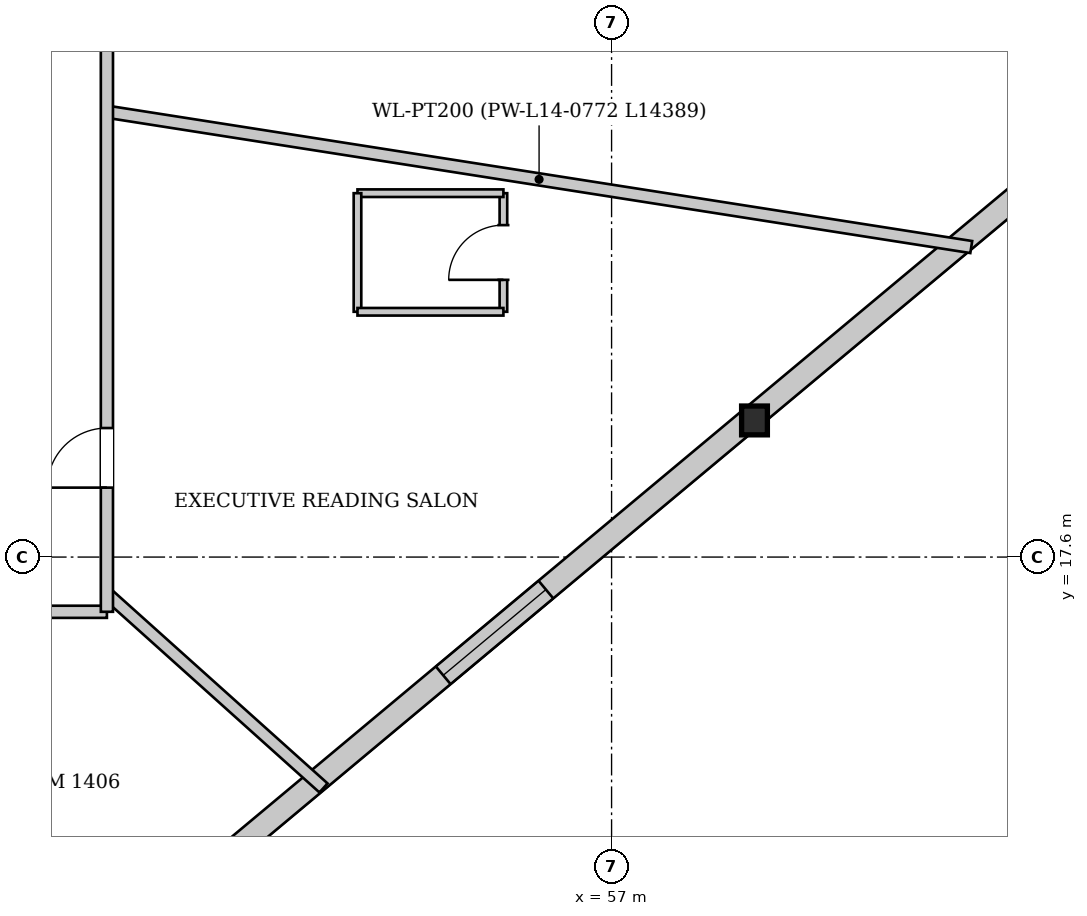
"""IFC4 building model, lengths in metres.
Left out: names, types, materials, properties, quantities, classifications, styles, units other than length and angle.
Written with IfcOpenShell. Run it as: python <this file> out.ifc"""

import sys

from ifc_helpers import new_model, si_unit, direction, frame, frame_2d, origin, origin_2d, place, context, subcontext, project, spatial, rectangle, i_section, extrude, source, transform, mapped, element, fill, save


model = new_model("IFC4")
c1 = context("Model", 3, precision=1e-05, world=origin(), true_north=direction((0.0, 1.0)))
c2 = subcontext(c1, "Body", "Model", "MODEL_VIEW")
j1 = project(units=[si_unit("LENGTHUNIT", "METRE"), si_unit("PLANEANGLEUNIT", "RADIAN")], contexts=[c1])
p1 = place(None, origin())
s1 = spatial("IfcSite", under=j1, at=p1, CompositionType="ELEMENT")
p2 = place(p1, origin())
s2 = spatial("IfcBuilding", under=s1, at=p2, CompositionType="ELEMENT")
p3 = place(p2, frame((0.0, 0.0, 57.7)))
s3 = spatial("IfcBuildingStorey", under=s2, at=p3, CompositionType="ELEMENT", Elevation=57.7)
m1 = source(origin(), c2, "Body", "SweptSolid", [
    extrude(i_section(OverallWidth=0.424, OverallDepth=0.474, WebThickness=0.043, FlangeThickness=0.068, at=origin_2d()), origin(), (0.0, 0.0, 1.0), 3.406),
])
p4 = place(p3, frame((59.321, 19.658, 0.0), z_axis=(0.01720061386, 0.110800620948, 0.993693796539), x_axis=(-0.988163882258, 0.15340189634, 0.0)))
e1 = element("IfcColumn", 1, at=p4, inside=s3, PredefinedType="COLUMN", context=c2, shape_type="MappedRepresentation", body=[
    mapped(m1, transform((0.0, 0.0, 0.0), x_axis=(1.0, 0.0, 0.0), y_axis=(0.0, 1.0, 0.0), z_axis=(0.0, 0.0, 1.0), scale=1.0)),
])
p5 = place(p3, frame((68.571, 27.629, 0.0), z_axis=(0.0, 0.0, 1.0), x_axis=(-0.767601375753, -0.640927552803, 0.0)))
e2 = element("IfcWall", 2, at=p5, inside=s3, PredefinedType="SOLIDWALL", context=c2, shape_type="SweptSolid", body=[
    extrude(rectangle(XDim=24.419, YDim=0.38, at=frame_2d((12.209, 0.0))), origin(), (0.0, 0.0, 1.0), 2.592),
])
p6 = place(p5, frame((4.137, 0.0, 0.222)))
e3 = element("IfcOpeningElement", 3, at=p6, cuts=e2, PredefinedType="OPENING", context=c2, shape_type="SweptSolid", body=[
    extrude(rectangle(XDim=2.2, YDim=2.25, at=frame_2d((1.1, 1.125))), frame((0.0, 0.2, 0.0), z_axis=(0.0, -1.0, 0.0), x_axis=(1.0, 0.0, 0.0)), (0.0, 0.0, 1.0), 0.4),
])
p7 = place(p5, frame((16.482, 0.0, 0.222)))
e4 = element("IfcOpeningElement", 4, at=p7, cuts=e2, PredefinedType="OPENING", context=c2, shape_type="SweptSolid", body=[
    extrude(rectangle(XDim=2.2, YDim=2.25, at=frame_2d((1.1, 1.125))), frame((0.0, 0.2, 0.0), z_axis=(0.0, -1.0, 0.0), x_axis=(1.0, 0.0, 0.0)), (0.0, 0.0, 1.0), 0.4),
])
p8 = place(p3, frame((48.7, 24.924, 0.0), z_axis=(0.0, 0.0, 1.0), x_axis=(0.98796232497, -0.154694681358, 0.0)))
e5 = element("IfcWall", 5, at=p8, inside=s3, PredefinedType="PARTITIONING", context=c2, shape_type="SweptSolid", body=[
    extrude(rectangle(XDim=14.388, YDim=0.2, at=frame_2d((7.194, 0.0))), origin(), (0.0, 0.0, 1.0), 3.3),
])
p9 = place(p3, frame((48.7, 17.0, 0.0), z_axis=(0.0, 0.0, 1.0), x_axis=(0.744305347835, -0.667839463632, 0.0)))
e6 = element("IfcWall", 6, at=p9, inside=s3, PredefinedType="PARTITIONING", context=c2, shape_type="SweptSolid", body=[
    extrude(rectangle(XDim=4.786, YDim=0.2, at=frame_2d((2.393, 0.0))), origin(), (0.0, 0.0, 1.0), 3.3),
])
p10 = place(p3, frame((55.221, 21.634, 0.0), z_axis=(0.0, 0.0, 1.0), x_axis=(0.0, 1.0, 0.0)))
e7 = element("IfcWall", 7, at=p10, inside=s3, PredefinedType="PARTITIONING", context=c2, shape_type="SweptSolid", body=[
    extrude(rectangle(XDim=1.95, YDim=0.125, at=frame_2d((0.975, 0.0))), origin(), (0.0, 0.0, 1.0), 3.3),
])
p11 = place(p10, frame((0.525, 0.0, 0.0)))
e8 = element("IfcOpeningElement", 8, at=p11, cuts=e7, PredefinedType="OPENING", context=c2, shape_type="SweptSolid", body=[
    extrude(rectangle(XDim=0.9, YDim=2.1, at=frame_2d((0.45, 1.05))), frame((0.0, 0.073, 0.0), z_axis=(0.0, -1.0, 0.0), x_axis=(1.0, 0.0, 0.0)), (0.0, 0.0, 1.0), 0.145),
])
p12 = place(p3, frame((55.221, 23.584, 0.0), z_axis=(0.0, 0.0, 1.0), x_axis=(-1.0, 0.0, 0.0)))
e9 = element("IfcWall", 9, at=p12, inside=s3, PredefinedType="PARTITIONING", context=c2, shape_type="SweptSolid", body=[
    extrude(rectangle(XDim=2.4, YDim=0.125, at=frame_2d((1.2, 0.0))), origin(), (0.0, 0.0, 1.0), 3.3),
])
p13 = place(p3, frame((52.821, 23.584, 0.0), z_axis=(0.0, 0.0, 1.0), x_axis=(0.0, -1.0, 0.0)))
e10 = element("IfcWall", 10, at=p13, inside=s3, PredefinedType="PARTITIONING", context=c2, shape_type="SweptSolid", body=[
    extrude(rectangle(XDim=1.95, YDim=0.125, at=frame_2d((0.975, 0.0))), origin(), (0.0, 0.0, 1.0), 3.3),
])
p14 = place(p3, frame((52.821, 21.634, 0.0), z_axis=(0.0, 0.0, 1.0), x_axis=(1.0, 0.0, 0.0)))
e11 = element("IfcWall", 11, at=p14, inside=s3, PredefinedType="PARTITIONING", context=c2, shape_type="SweptSolid", body=[
    extrude(rectangle(XDim=2.4, YDim=0.125, at=frame_2d((1.2, 0.0))), origin(), (0.0, 0.0, 1.0), 3.3),
])
p15 = place(p3, frame((27.3, 16.7, 0.0), z_axis=(0.0, 0.0, 1.0), x_axis=(1.0, 0.0, 0.0)))
e12 = element("IfcWall", 12, at=p15, inside=s3, PredefinedType="PARTITIONING", context=c2, shape_type="SweptSolid", body=[
    extrude(rectangle(XDim=21.4, YDim=0.2, at=frame_2d((10.7, 0.0))), origin(), (0.0, 0.0, 1.0), 3.3),
])
p16 = place(p15, frame((0.3, 0.0, 0.0)))
e13 = element("IfcOpeningElement", 13, at=p16, cuts=e12, PredefinedType="OPENING", context=c2, shape_type="SweptSolid", body=[
    extrude(rectangle(XDim=0.98, YDim=2.15, at=frame_2d((0.49, 1.075))), frame((0.0, 0.11, 0.0), z_axis=(0.0, -1.0, 0.0), x_axis=(1.0, 0.0, 0.0)), (0.0, 0.0, 1.0), 0.22),
])
p17 = place(p15, frame((6.983, 0.0, 0.0)))
e14 = element("IfcOpeningElement", 14, at=p17, cuts=e12, PredefinedType="OPENING", context=c2, shape_type="SweptSolid", body=[
    extrude(rectangle(XDim=0.98, YDim=2.15, at=frame_2d((0.49, 1.075))), frame((0.0, 0.11, 0.0), z_axis=(0.0, -1.0, 0.0), x_axis=(1.0, 0.0, 0.0)), (0.0, 0.0, 1.0), 0.22),
])
p18 = place(p15, frame((18.929, 0.0, 0.0)))
e15 = element("IfcOpeningElement", 15, at=p18, cuts=e12, PredefinedType="OPENING", context=c2, shape_type="SweptSolid", body=[
    extrude(rectangle(XDim=0.98, YDim=2.15, at=frame_2d((0.49, 1.075))), frame((0.0, 0.11, 0.0), z_axis=(0.0, -1.0, 0.0), x_axis=(1.0, 0.0, 0.0)), (0.0, 0.0, 1.0), 0.22),
])
p19 = place(p3, frame((48.7, 16.7, 0.0), z_axis=(0.0, 0.0, 1.0), x_axis=(0.0, 1.0, 0.0)))
e16 = element("IfcWall", 16, at=p19, inside=s3, PredefinedType="PARTITIONING", context=c2, shape_type="SweptSolid", body=[
    extrude(rectangle(XDim=19.8, YDim=0.2, at=frame_2d((9.9, 0.0))), origin(), (0.0, 0.0, 1.0), 3.3),
])
p20 = place(p19, frame((2.042, 0.0, 0.0)))
e17 = element("IfcOpeningElement", 17, at=p20, cuts=e16, PredefinedType="OPENING", context=c2, shape_type="SweptSolid", body=[
    extrude(rectangle(XDim=0.98, YDim=2.15, at=frame_2d((0.49, 1.075))), frame((0.0, 0.11, 0.0), z_axis=(0.0, -1.0, 0.0), x_axis=(1.0, 0.0, 0.0)), (0.0, 0.0, 1.0), 0.22),
])
m2 = source(origin(), c2, "Body", "SweptSolid", [
    extrude(rectangle(XDim=2.2, YDim=2.25, at=frame_2d((1.1, 1.125))), frame((0.0, 0.03, 0.0), z_axis=(0.0, -1.0, 0.0), x_axis=(1.0, 0.0, 0.0)), (0.0, 0.0, 1.0), 0.06),
])
p21 = place(p7, origin())
e18 = element("IfcWindow", 18, at=p21, inside=s3, PartitioningType="SINGLE_PANEL", PredefinedType="WINDOW", context=c2, shape_type="MappedRepresentation", body=[
    mapped(m2, transform((0.0, 0.0, 0.0), x_axis=(1.0, 0.0, 0.0), y_axis=(0.0, 1.0, 0.0), z_axis=(0.0, 0.0, 1.0), scale=1.0)),
])
fill(e4, e18)
m3 = source(origin(), c2, "Body", "SweptSolid", [
    extrude(rectangle(XDim=0.9, YDim=2.1, at=frame_2d((0.45, 1.05))), frame((0.0, 0.025, 0.0), z_axis=(0.0, -1.0, 0.0), x_axis=(1.0, 0.0, 0.0)), (0.0, 0.0, 1.0), 0.05),
])
p22 = place(p11, origin())
e19 = element("IfcDoor", 19, at=p22, inside=s3, OperationType="SINGLE_SWING_LEFT", PredefinedType="DOOR", context=c2, shape_type="MappedRepresentation", body=[
    mapped(m3, transform((0.0, 0.0, 0.0), x_axis=(1.0, 0.0, 0.0), y_axis=(0.0, 1.0, 0.0), z_axis=(0.0, 0.0, 1.0), scale=1.0)),
])
fill(e8, e19)
m4 = source(origin(), c2, "Body", "SweptSolid", [
    extrude(rectangle(XDim=0.98, YDim=2.15, at=frame_2d((0.49, 1.075))), frame((0.0, 0.025, 0.0), z_axis=(0.0, -1.0, 0.0), x_axis=(1.0, 0.0, 0.0)), (0.0, 0.0, 1.0), 0.05),
])
p23 = place(p20, origin())
e20 = element("IfcDoor", 20, at=p23, inside=s3, OperationType="SINGLE_SWING_LEFT", PredefinedType="DOOR", context=c2, shape_type="MappedRepresentation", body=[
    mapped(m4, transform((0.0, 0.0, 0.0), x_axis=(1.0, 0.0, 0.0), y_axis=(0.0, 1.0, 0.0), z_axis=(0.0, 0.0, 1.0), scale=1.0)),
])
fill(e17, e20)
save(model, sys.argv[1])
